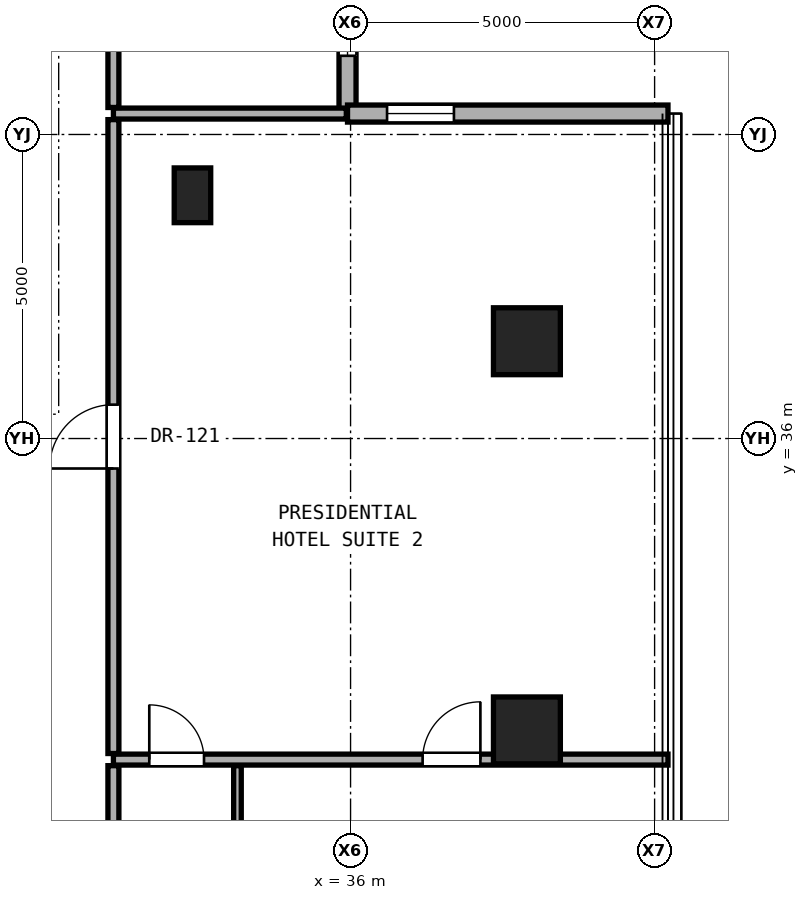
"""IFC4 building model, lengths in metres.
Left out: names, types, materials, properties, quantities, classifications, styles, units other than length and angle.
Written with IfcOpenShell. Run it as: python <this file> out.ifc"""

import sys

from ifc_helpers import new_model, si_unit, direction, frame, frame_2d, origin, origin_2d, place, context, subcontext, project, spatial, rectangle, hollow_rectangle, extrude, element, fill, save


model = new_model("IFC4")
c1 = context("Model", 3, precision=1e-05, world=origin(), true_north=direction((0.0, 1.0)))
c2 = subcontext(c1, "Body", "Model", "MODEL_VIEW")
j1 = project(units=[si_unit("LENGTHUNIT", "METRE"), si_unit("PLANEANGLEUNIT", "RADIAN")], contexts=[c1])
p1 = place(None, origin())
s1 = spatial("IfcSite", under=j1, at=p1, CompositionType="ELEMENT")
p2 = place(p1, origin())
s2 = spatial("IfcBuilding", under=s1, at=p2, CompositionType="ELEMENT")
p3 = place(p2, frame((0.0, 0.0, 128.0)))
s3 = spatial("IfcBuildingStorey", under=s2, at=p3, CompositionType="ELEMENT", Elevation=128.0)
for number, where, z_axis, x_axis in (
    (1, (38.9, 31.2, 0.0), (0.0, 0.0, 1.0), (1.0, 0.0, 0.0)),
    (2, (38.9, 37.6, 0.0), (0.0, 0.0, 1.0), (1.0, 0.0, 0.0)),
):
    element("IfcColumn", number, at=place(p3, frame(where, z_axis=z_axis, x_axis=x_axis)), inside=s3, PredefinedType="COLUMN", context=c2, shape_type="SweptSolid", body=[
        extrude(hollow_rectangle(XDim=1.1, YDim=1.1, WallThickness=0.06, at=origin_2d()), origin(), (0.0, 0.0, 1.0), 3.3),
    ])
p4 = place(p3, frame((33.4, 40.0, 0.0), z_axis=(0.0, 0.0, 1.0), x_axis=(1.0, 0.0, 0.0)))
e3 = element("IfcColumn", 3, at=p4, inside=s3, PredefinedType="PILASTER", context=c2, shape_type="SweptSolid", body=[
    extrude(rectangle(XDim=0.6, YDim=0.9, at=origin_2d()), origin(), (0.0, 0.0, 1.0), 3.3),
])
p5 = place(p3, frame((35.95, 41.344, 0.0), z_axis=(0.0, 0.0, 1.0), x_axis=(0.0, 1.0, 0.0)))
e4 = element("IfcWall", 4, at=p5, inside=s3, PredefinedType="SOLIDWALL", context=c2, shape_type="SweptSolid", body=[
    extrude(rectangle(XDim=5.27, YDim=0.28, at=frame_2d((2.635, 0.0))), origin(), (0.0, 0.0, 1.0), 3.06),
])
p6 = place(p5, frame((0.95, 0.0, 0.85)))
e5 = element("IfcOpeningElement", 5, at=p6, cuts=e4, PredefinedType="OPENING", context=c2, shape_type="SweptSolid", body=[
    extrude(rectangle(XDim=1.1, YDim=2.0, at=frame_2d((0.55, 1.0))), frame((0.0, 0.15, 0.0), z_axis=(0.0, -1.0, 0.0), x_axis=(1.0, 0.0, 0.0)), (0.0, 0.0, 1.0), 0.3),
])
p7 = place(p3, frame((41.22, 41.344, 0.0), z_axis=(0.0, 0.0, 1.0), x_axis=(-1.0, 0.0, 0.0)))
e6 = element("IfcWall", 6, at=p7, inside=s3, PredefinedType="SOLIDWALL", context=c2, shape_type="SweptSolid", body=[
    extrude(rectangle(XDim=5.27, YDim=0.28, at=frame_2d((2.635, 0.0))), origin(), (0.0, 0.0, 1.0), 3.06),
])
p8 = place(p7, frame((3.52, 0.0, 0.85)))
e7 = element("IfcOpeningElement", 7, at=p8, cuts=e6, PredefinedType="OPENING", context=c2, shape_type="SweptSolid", body=[
    extrude(rectangle(XDim=1.1, YDim=2.0, at=frame_2d((0.55, 1.0))), frame((0.0, 0.15, 0.0), z_axis=(0.0, -1.0, 0.0), x_axis=(1.0, 0.0, 0.0)), (0.0, 0.0, 1.0), 0.3),
])
p9 = place(p3, frame((32.1, 30.72, 0.0), z_axis=(0.0, 0.0, 1.0), x_axis=(1.0, 0.0, 0.0)))
e8 = element("IfcWall", 8, at=p9, inside=s3, PredefinedType="PARTITIONING", context=c2, shape_type="SweptSolid", body=[
    extrude(rectangle(XDim=9.12, YDim=0.18, at=frame_2d((4.56, 0.0))), origin(), (0.0, 0.0, 1.0), 2.299),
])
p10 = place(p9, frame((5.085, 0.0, 0.0)))
e9 = element("IfcOpeningElement", 9, at=p10, cuts=e8, PredefinedType="OPENING", context=c2, shape_type="SweptSolid", body=[
    extrude(rectangle(XDim=0.95, YDim=2.15, at=frame_2d((0.475, 1.075))), frame((0.0, 0.1, 0.0), z_axis=(0.0, -1.0, 0.0), x_axis=(1.0, 0.0, 0.0)), (0.0, 0.0, 1.0), 0.2),
])
p11 = place(p9, frame((0.59, 0.0, 0.0)))
e10 = element("IfcOpeningElement", 10, at=p11, cuts=e8, PredefinedType="OPENING", context=c2, shape_type="SweptSolid", body=[
    extrude(rectangle(XDim=0.9, YDim=2.1, at=frame_2d((0.45, 1.05))), frame((0.0, 0.1, 0.0), z_axis=(0.0, -1.0, 0.0), x_axis=(1.0, 0.0, 0.0)), (0.0, 0.0, 1.0), 0.2),
])
p12 = place(p3, frame((32.1, 41.344, 0.0), z_axis=(0.0, 0.0, 1.0), x_axis=(1.0, 0.0, 0.0)))
e11 = element("IfcWall", 11, at=p12, inside=s3, PredefinedType="PARTITIONING", context=c2, shape_type="SweptSolid", body=[
    extrude(rectangle(XDim=3.83, YDim=0.18, at=frame_2d((1.915, 0.0))), origin(), (0.0, 0.0, 1.0), 3.08),
])
p13 = place(p3, frame((32.1, 28.073, 0.0), z_axis=(0.0, 0.0, 1.0), x_axis=(0.0, 1.0, 0.0)))
e12 = element("IfcWall", 12, at=p13, inside=s3, PredefinedType="PARTITIONING", context=c2, shape_type="SweptSolid", body=[
    extrude(rectangle(XDim=2.548, YDim=0.18, at=frame_2d((1.274, 0.0))), origin(), (0.0, 0.0, 1.0), 3.08),
])
p14 = place(p3, frame((32.1, 30.82, 0.0), z_axis=(0.0, 0.0, 1.0), x_axis=(0.0, 1.0, 0.0)))
e13 = element("IfcWall", 13, at=p14, inside=s3, PredefinedType="PARTITIONING", context=c2, shape_type="SweptSolid", body=[
    extrude(rectangle(XDim=10.424, YDim=0.18, at=frame_2d((5.212, 0.0))), origin(), (0.0, 0.0, 1.0), 2.299),
])
p15 = place(p14, frame((4.687, 0.0, 0.0)))
e14 = element("IfcOpeningElement", 14, at=p15, cuts=e13, PredefinedType="OPENING", context=c2, shape_type="SweptSolid", body=[
    extrude(rectangle(XDim=1.05, YDim=2.2, at=frame_2d((0.525, 1.1))), frame((0.0, 0.1, 0.0), z_axis=(0.0, -1.0, 0.0), x_axis=(1.0, 0.0, 0.0)), (0.0, 0.0, 1.0), 0.2),
])
p16 = place(p3, frame((32.1, 41.444, 0.0), z_axis=(0.0, 0.0, 1.0), x_axis=(0.0, 1.0, 0.0)))
e15 = element("IfcWall", 15, at=p16, inside=s3, PredefinedType="PARTITIONING", context=c2, shape_type="SweptSolid", body=[
    extrude(rectangle(XDim=5.17, YDim=0.18, at=frame_2d((2.585, 0.0))), origin(), (0.0, 0.0, 1.0), 3.08),
])
p17 = place(p16, frame((2.11, 0.0, 0.0)))
e16 = element("IfcOpeningElement", 16, at=p17, cuts=e15, PredefinedType="OPENING", context=c2, shape_type="SweptSolid", body=[
    extrude(rectangle(XDim=0.95, YDim=2.15, at=frame_2d((0.475, 1.075))), frame((0.0, 0.1, 0.0), z_axis=(0.0, -1.0, 0.0), x_axis=(1.0, 0.0, 0.0)), (0.0, 0.0, 1.0), 0.2),
])
p18 = place(p3, frame((34.14, 28.073, 0.0), z_axis=(0.0, 0.0, 1.0), x_axis=(0.0, 1.0, 0.0)))
e17 = element("IfcWall", 17, at=p18, inside=s3, PredefinedType="PARTITIONING", context=c2, shape_type="SweptSolid", body=[
    extrude(rectangle(XDim=2.548, YDim=0.125, at=frame_2d((1.274, 0.0))), origin(), (0.0, 0.0, 1.0), 3.08),
])
p19 = place(p6, origin())
e18 = element("IfcWindow", 18, at=p19, inside=s3, PartitioningType="SINGLE_PANEL", PredefinedType="WINDOW", context=c2, shape_type="SweptSolid", body=[
    extrude(rectangle(XDim=1.1, YDim=2.0, at=frame_2d((0.55, 1.0))), frame((0.0, 0.03, 0.0), z_axis=(0.0, -1.0, 0.0), x_axis=(1.0, 0.0, 0.0)), (0.0, 0.0, 1.0), 0.06),
])
fill(e5, e18)
p20 = place(p8, origin())
e19 = element("IfcWindow", 19, at=p20, inside=s3, PartitioningType="SINGLE_PANEL", PredefinedType="WINDOW", context=c2, shape_type="SweptSolid", body=[
    extrude(rectangle(XDim=1.1, YDim=2.0, at=frame_2d((0.55, 1.0))), frame((0.0, 0.03, 0.0), z_axis=(0.0, -1.0, 0.0), x_axis=(1.0, 0.0, 0.0)), (0.0, 0.0, 1.0), 0.06),
])
fill(e7, e19)
p21 = place(p15, origin())
e20 = element("IfcDoor", 20, at=p21, inside=s3, OperationType="SINGLE_SWING_LEFT", PredefinedType="DOOR", context=c2, shape_type="SweptSolid", body=[
    extrude(rectangle(XDim=1.05, YDim=2.2, at=frame_2d((0.525, 1.1))), frame((0.0, 0.025, 0.0), z_axis=(0.0, -1.0, 0.0), x_axis=(1.0, 0.0, 0.0)), (0.0, 0.0, 1.0), 0.05),
])
fill(e14, e20)
p22 = place(p10, origin())
e21 = element("IfcDoor", 21, at=p22, inside=s3, OperationType="SINGLE_SWING_RIGHT", PredefinedType="DOOR", context=c2, shape_type="SweptSolid", body=[
    extrude(rectangle(XDim=0.95, YDim=2.15, at=frame_2d((0.475, 1.075))), frame((0.0, 0.025, 0.0), z_axis=(0.0, -1.0, 0.0), x_axis=(1.0, 0.0, 0.0)), (0.0, 0.0, 1.0), 0.05),
])
fill(e9, e21)
p23 = place(p11, origin())
e22 = element("IfcDoor", 22, at=p23, inside=s3, OperationType="SINGLE_SWING_LEFT", PredefinedType="DOOR", context=c2, shape_type="SweptSolid", body=[
    extrude(rectangle(XDim=0.9, YDim=2.1, at=frame_2d((0.45, 1.05))), frame((0.0, 0.025, 0.0), z_axis=(0.0, -1.0, 0.0), x_axis=(1.0, 0.0, 0.0)), (0.0, 0.0, 1.0), 0.05),
])
fill(e10, e22)
save(model, sys.argv[1])
